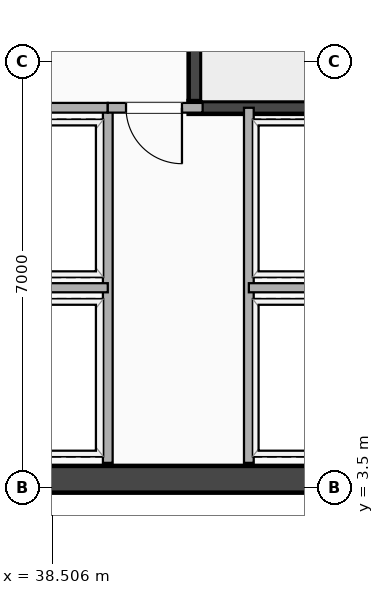
"""IFC4 building model, lengths in metres.
Left out: names, types, materials, properties, quantities, classifications, styles, units other than length and angle.
Written with IfcOpenShell. Run it as: python <this file> out.ifc"""

import sys

from ifc_helpers import new_model, si_unit, direction, frame, frame_2d, origin, place, context, subcontext, project, spatial, rectangle, extrude, element, fill, save


model = new_model("IFC4")
c1 = context("Model", 3, precision=1e-05, world=origin(), true_north=direction((0.0, 1.0)))
c2 = subcontext(c1, "Body", "Model", "MODEL_VIEW")
j1 = project(units=[si_unit("LENGTHUNIT", "METRE"), si_unit("PLANEANGLEUNIT", "RADIAN")], contexts=[c1])
p1 = place(None, origin())
s1 = spatial("IfcSite", under=j1, at=p1, CompositionType="ELEMENT")
p2 = place(p1, origin())
s2 = spatial("IfcBuilding", under=s1, at=p2, CompositionType="ELEMENT")
p3 = place(p2, frame((0.0, 0.0, 83.8)))
s3 = spatial("IfcBuildingStorey", under=s2, at=p3, CompositionType="ELEMENT", Elevation=83.8)
p4 = place(p3, frame((20.3, 3.63, 0.0), z_axis=(0.0, 0.0, 1.0), x_axis=(1.0, 0.0, 0.0)))
e1 = element("IfcWall", 1, at=p4, inside=s3, PredefinedType="SHEAR", context=c2, shape_type="SweptSolid", body=[
    extrude(rectangle(XDim=24.5, YDim=0.44, at=frame_2d((12.25, 0.0))), origin(), (0.0, 0.0, 1.0), 4.14),
])
p5 = place(p3, frame((40.855, 9.745, 0.0), z_axis=(0.0, 0.0, 1.0), x_axis=(0.0, 1.0, 0.0)))
e2 = element("IfcWall", 2, at=p5, inside=s3, PredefinedType="SHEAR", context=c2, shape_type="SweptSolid", body=[
    extrude(rectangle(XDim=8.01, YDim=0.21, at=frame_2d((4.005, 0.0))), origin(), (0.0, 0.0, 1.0), 4.14),
])
p6 = place(p3, frame((40.75, 9.745, 0.0), z_axis=(0.0, 0.0, 1.0), x_axis=(1.0, 0.0, 0.0)))
e3 = element("IfcWall", 3, at=p6, inside=s3, PredefinedType="SHEAR", context=c2, shape_type="SweptSolid", body=[
    extrude(rectangle(XDim=3.66, YDim=0.21, at=frame_2d((1.83, 0.0))), origin(), (0.0, 0.0, 1.0), 4.14),
])
for number, where, z_axis, x_axis in (
    (4, (39.42, 3.9, 0.0), (0.0, 0.0, 1.0), (0.0, 1.0, 0.0)),
    (5, (41.74, 3.9, 0.0), (0.0, 0.0, 1.0), (0.0, 1.0, 0.0)),
):
    element("IfcWall", number, at=place(p3, frame(where, z_axis=z_axis, x_axis=x_axis)), inside=s3, PredefinedType="PARTITIONING", context=c2, shape_type="SweptSolid", body=[
        extrude(rectangle(XDim=5.84, YDim=0.16, at=frame_2d((2.92, 0.0))), origin(), (0.0, 0.0, 1.0), 4.14),
    ])
p7 = place(p3, frame((37.25, 6.78, 0.0), z_axis=(0.0, 0.0, 1.0), x_axis=(1.0, 0.0, 0.0)))
e6 = element("IfcWall", 6, at=p7, inside=s3, PredefinedType="PARTITIONING", context=c2, shape_type="SweptSolid", body=[
    extrude(rectangle(XDim=2.17, YDim=0.15, at=frame_2d((1.085, 0.0))), origin(), (0.0, 0.0, 1.0), 4.14),
])
p8 = place(p3, frame((41.74, 6.78, 0.0), z_axis=(0.0, 0.0, 1.0), x_axis=(1.0, 0.0, 0.0)))
e7 = element("IfcWall", 7, at=p8, inside=s3, PredefinedType="PARTITIONING", context=c2, shape_type="SweptSolid", body=[
    extrude(rectangle(XDim=2.66, YDim=0.15, at=frame_2d((1.33, 0.0))), origin(), (0.0, 0.0, 1.0), 3.213),
])
p9 = place(p3, frame((37.25, 9.74, 0.0), z_axis=(0.0, 0.0, 1.0), x_axis=(1.0, 0.0, 0.0)))
e8 = element("IfcWall", 8, at=p9, inside=s3, PredefinedType="PARTITIONING", context=c2, shape_type="SweptSolid", body=[
    extrude(rectangle(XDim=2.17, YDim=0.16, at=frame_2d((1.085, 0.0))), origin(), (0.0, 0.0, 1.0), 4.14),
])
p10 = place(p3, frame((39.42, 9.74, 0.0), z_axis=(0.0, 0.0, 1.0), x_axis=(1.0, 0.0, 0.0)))
e9 = element("IfcWall", 9, at=p10, inside=s3, PredefinedType="PARTITIONING", context=c2, shape_type="SweptSolid", body=[
    extrude(rectangle(XDim=1.56, YDim=0.16, at=frame_2d((0.78, 0.0))), origin(), (0.0, 0.0, 1.0), 4.14),
])
p11 = place(p10, frame((0.3, 0.0, 0.0)))
e10 = element("IfcOpeningElement", 10, at=p11, cuts=e9, PredefinedType="OPENING", context=c2, shape_type="SweptSolid", body=[
    extrude(rectangle(XDim=0.92, YDim=2.08, at=frame_2d((0.46, 1.04))), frame((0.0, 0.09, 0.0), z_axis=(0.0, -1.0, 0.0), x_axis=(1.0, 0.0, 0.0)), (0.0, 0.0, 1.0), 0.18),
])
p12 = place(p11, origin())
e11 = element("IfcDoor", 11, at=p12, inside=s3, OperationType="SINGLE_SWING_RIGHT", PredefinedType="DOOR", context=c2, shape_type="SweptSolid", body=[
    extrude(rectangle(XDim=0.92, YDim=2.08, at=frame_2d((0.46, 1.04))), frame((0.0, 0.025, 0.0), z_axis=(0.0, -1.0, 0.0), x_axis=(1.0, 0.0, 0.0)), (0.0, 0.0, 1.0), 0.05),
])
fill(e10, e11)
save(model, sys.argv[1])
